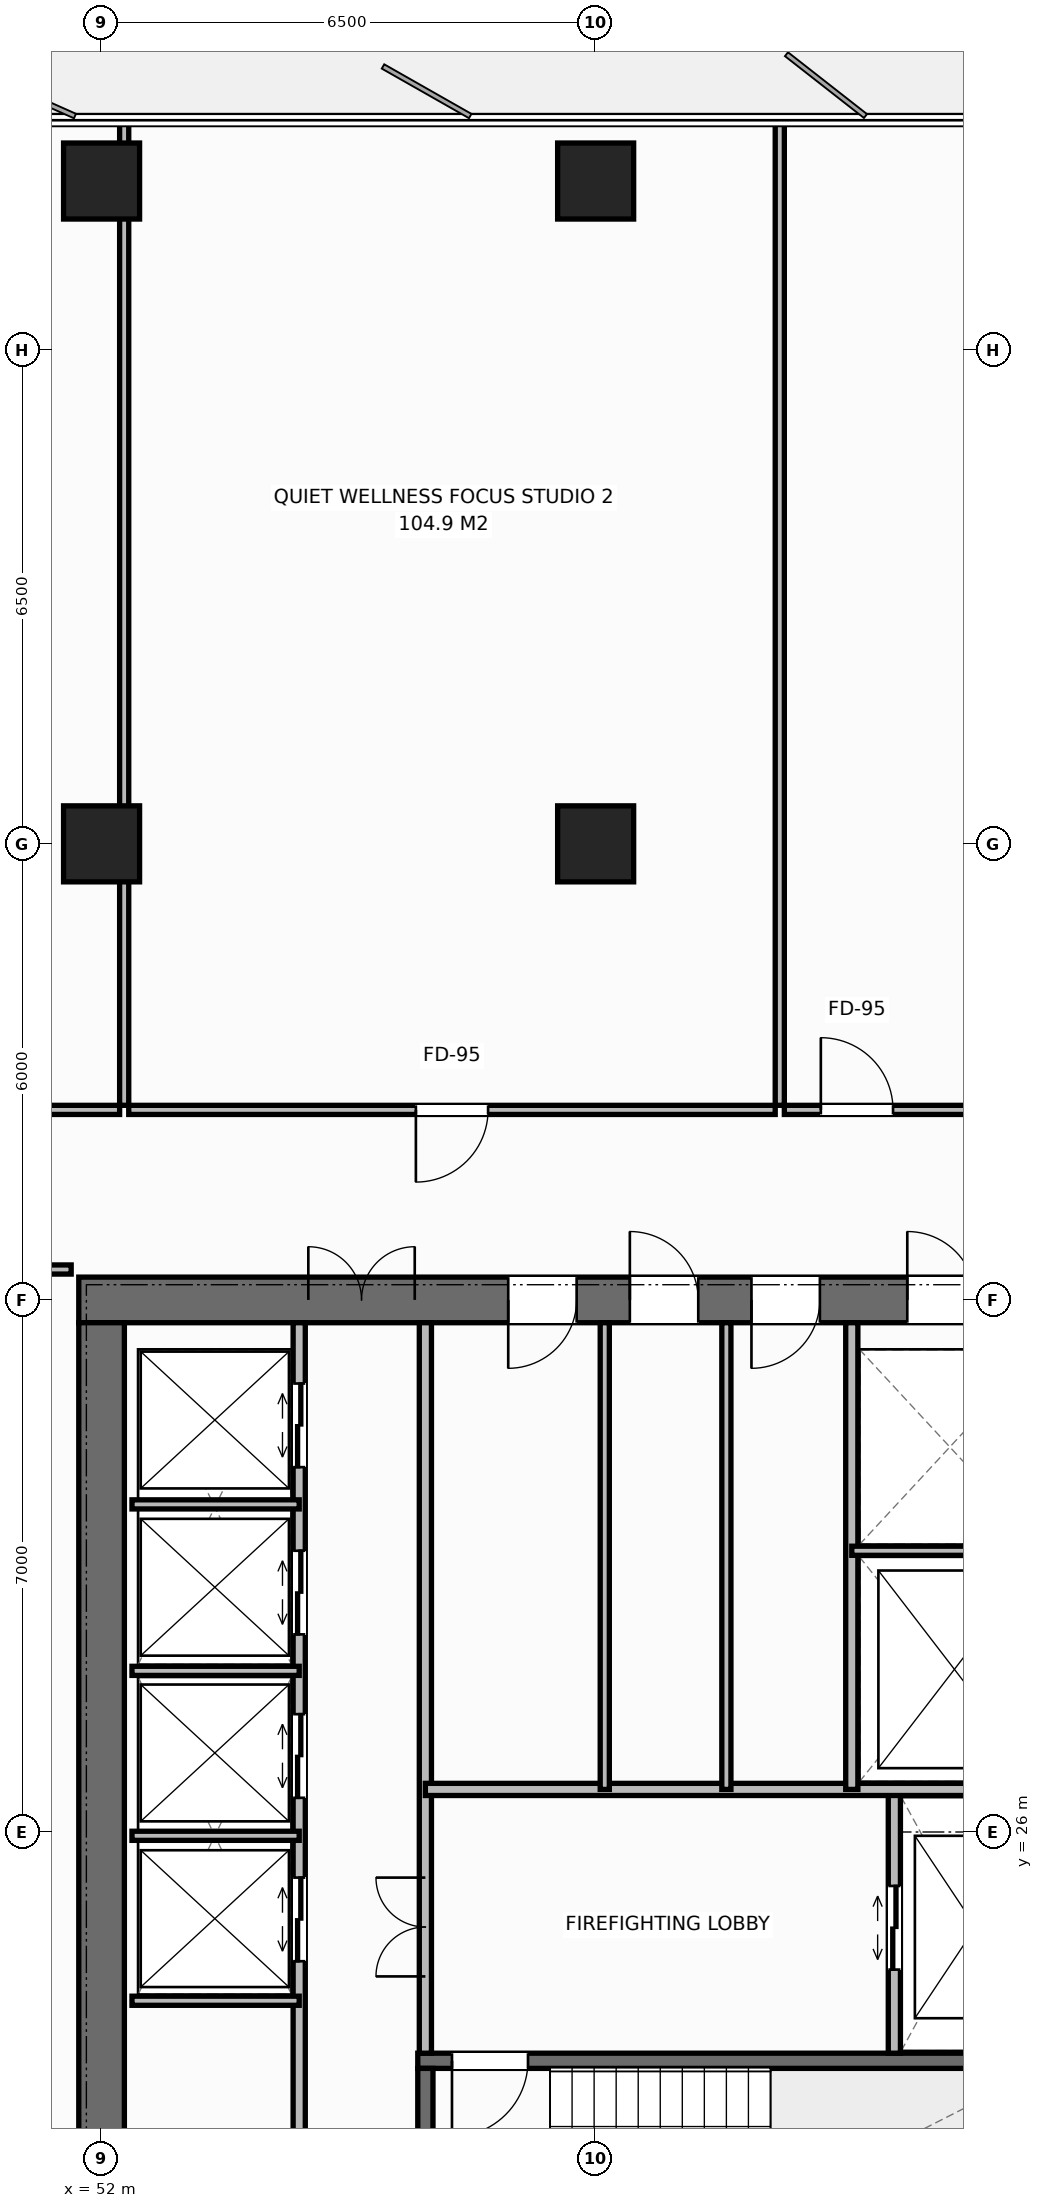
"""IFC4 building model, lengths in metres.
Left out: names, types, materials, properties, quantities, classifications, styles, units other than length and angle.
Written with IfcOpenShell. Run it as: python <this file> out.ifc"""

import sys

from ifc_helpers import new_model, si_unit, direction, frame, frame_2d, origin, origin_2d, place, context, subcontext, project, spatial, rectangle, extrude, element, fill, save


model = new_model("IFC4")
c1 = context("Model", 3, precision=1e-05, world=origin(), true_north=direction((0.0, 1.0)))
c2 = subcontext(c1, "Body", "Model", "MODEL_VIEW")
j1 = project(units=[si_unit("LENGTHUNIT", "METRE"), si_unit("PLANEANGLEUNIT", "RADIAN")], contexts=[c1])
p1 = place(None, origin())
s1 = spatial("IfcSite", under=j1, at=p1, CompositionType="ELEMENT")
p2 = place(p1, origin())
s2 = spatial("IfcBuilding", under=s1, at=p2, CompositionType="ELEMENT")
p3 = place(p2, frame((0.0, 0.0, 144.2)))
s3 = spatial("IfcBuildingStorey", under=s2, at=p3, CompositionType="ELEMENT", Elevation=144.2)
p4 = place(p3, frame((51.7, 33.0, 0.0), z_axis=(0.0, 0.0, 1.0), x_axis=(1.0, 0.0, 0.0)))
e1 = element("IfcWall", 1, at=p4, inside=s3, PredefinedType="SHEAR", context=c2, shape_type="SweptSolid", body=[
    extrude(rectangle(XDim=13.6, YDim=0.6, at=frame_2d((6.8, 0.0))), origin(), (0.0, 0.0, 1.0), 3.8),
])
p5 = place(p4, frame((3.02, 0.0, 0.0)))
e2 = element("IfcOpeningElement", 2, at=p5, cuts=e1, PredefinedType="OPENING", context=c2, shape_type="SweptSolid", body=[
    extrude(rectangle(XDim=1.4, YDim=2.2, at=frame_2d((0.7, 1.1))), frame((0.0, 0.31, 0.0), z_axis=(0.0, -1.0, 0.0), x_axis=(1.0, 0.0, 0.0)), (0.0, 0.0, 1.0), 0.62),
])
p6 = place(p4, frame((10.9, 0.0, 0.0)))
e3 = element("IfcOpeningElement", 3, at=p6, cuts=e1, PredefinedType="OPENING", context=c2, shape_type="SweptSolid", body=[
    extrude(rectangle(XDim=0.9, YDim=2.15, at=frame_2d((0.45, 1.075))), frame((0.0, 0.31, 0.0), z_axis=(0.0, -1.0, 0.0), x_axis=(1.0, 0.0, 0.0)), (0.0, 0.0, 1.0), 0.62),
])
p7 = place(p4, frame((5.65, 0.0, 0.0)))
e4 = element("IfcOpeningElement", 4, at=p7, cuts=e1, PredefinedType="OPENING", context=c2, shape_type="SweptSolid", body=[
    extrude(rectangle(XDim=0.9, YDim=2.15, at=frame_2d((0.45, 1.075))), frame((0.0, 0.31, 0.0), z_axis=(0.0, -1.0, 0.0), x_axis=(1.0, 0.0, 0.0)), (0.0, 0.0, 1.0), 0.62),
])
p8 = place(p4, frame((7.25, 0.0, 0.0)))
e5 = element("IfcOpeningElement", 5, at=p8, cuts=e1, PredefinedType="OPENING", context=c2, shape_type="SweptSolid", body=[
    extrude(rectangle(XDim=0.9, YDim=2.15, at=frame_2d((0.45, 1.075))), frame((0.0, 0.31, 0.0), z_axis=(0.0, -1.0, 0.0), x_axis=(1.0, 0.0, 0.0)), (0.0, 0.0, 1.0), 0.62),
])
p9 = place(p4, frame((8.85, 0.0, 0.0)))
e6 = element("IfcOpeningElement", 6, at=p9, cuts=e1, PredefinedType="OPENING", context=c2, shape_type="SweptSolid", body=[
    extrude(rectangle(XDim=0.9, YDim=2.15, at=frame_2d((0.45, 1.075))), frame((0.0, 0.31, 0.0), z_axis=(0.0, -1.0, 0.0), x_axis=(1.0, 0.0, 0.0)), (0.0, 0.0, 1.0), 0.62),
])
p10 = place(p3, frame((52.0, 19.3, 0.0), z_axis=(0.0, 0.0, 1.0), x_axis=(0.0, 1.0, 0.0)))
e7 = element("IfcWall", 7, at=p10, inside=s3, PredefinedType="SHEAR", context=c2, shape_type="SweptSolid", body=[
    extrude(rectangle(XDim=13.4, YDim=0.6, at=frame_2d((6.7, 0.0))), origin(), (0.0, 0.0, 1.0), 3.8),
])
p11 = place(p3, frame((56.16, 22.99, 0.0), z_axis=(0.0, 0.0, 1.0), x_axis=(1.0, 0.0, 0.0)))
e8 = element("IfcWall", 8, at=p11, inside=s3, PredefinedType="SHEAR", context=c2, shape_type="SweptSolid", body=[
    extrude(rectangle(XDim=8.43, YDim=0.2, at=frame_2d((4.215, 0.0))), origin(), (0.0, 0.0, 1.0), 3.8),
])
p12 = place(p11, frame((0.45, 0.0, 0.0)))
e9 = element("IfcOpeningElement", 9, at=p12, cuts=e8, PredefinedType="OPENING", context=c2, shape_type="SweptSolid", body=[
    extrude(rectangle(XDim=1.0, YDim=2.15, at=frame_2d((0.5, 1.075))), frame((0.0, 0.11, 0.0), z_axis=(0.0, -1.0, 0.0), x_axis=(1.0, 0.0, 0.0)), (0.0, 0.0, 1.0), 0.22),
])
p13 = place(p3, frame((56.26, 19.61, 0.0), z_axis=(0.0, 0.0, 1.0), x_axis=(0.0, 1.0, 0.0)))
e10 = element("IfcWall", 10, at=p13, inside=s3, PredefinedType="SHEAR", context=c2, shape_type="SweptSolid", body=[
    extrude(rectangle(XDim=3.28, YDim=0.2, at=frame_2d((1.64, 0.0))), origin(), (0.0, 0.0, 1.0), 3.8),
])
for number, where, z_axis, x_axis in (
    (11, (58.5, 39.0, 0.0), (0.0, 0.0, 1.0), (1.0, 0.0, 0.0)),
    (12, (52.0, 39.0, 0.0), (0.0, 0.0, 1.0), (1.0, 0.0, 0.0)),
    (13, (52.0, 47.72, 0.0), (0.0, 0.0, 1.0), (1.0, 0.0, 0.0)),
    (14, (58.5, 47.72, 0.0), (0.0, 0.0, 1.0), (1.0, 0.0, 0.0)),
):
    element("IfcColumn", number, at=place(p3, frame(where, z_axis=z_axis, x_axis=x_axis)), inside=s3, PredefinedType="COLUMN", context=c2, shape_type="SweptSolid", body=[
        extrude(rectangle(XDim=1.0, YDim=1.0, at=origin_2d()), origin(), (0.0, 0.0, 1.0), 3.8),
    ])
p14 = place(p3, frame((54.6, 19.3, 0.0), z_axis=(0.0, 0.0, 1.0), x_axis=(0.0, 1.0, 0.0)))
e15 = element("IfcWall", 15, at=p14, inside=s3, PredefinedType="STANDARD", context=c2, shape_type="SweptSolid", body=[
    extrude(rectangle(XDim=13.4, YDim=0.16, at=frame_2d((6.7, 0.0))), origin(), (0.0, 0.0, 1.0), 3.572),
])
p15 = place(p14, frame((1.7, 0.0, 0.0)))
e16 = element("IfcOpeningElement", 16, at=p15, cuts=e15, PredefinedType="OPENING", context=c2, shape_type="SweptSolid", body=[
    extrude(rectangle(XDim=0.95, YDim=2.15, at=frame_2d((0.475, 1.075))), frame((0.0, 0.09, 0.0), z_axis=(0.0, -1.0, 0.0), x_axis=(1.0, 0.0, 0.0)), (0.0, 0.0, 1.0), 0.18),
])
p16 = place(p14, frame((5.0, 0.0, 0.0)))
e17 = element("IfcOpeningElement", 17, at=p16, cuts=e15, PredefinedType="OPENING", context=c2, shape_type="SweptSolid", body=[
    extrude(rectangle(XDim=1.1, YDim=2.2, at=frame_2d((0.55, 1.1))), frame((0.0, 0.09, 0.0), z_axis=(0.0, -1.0, 0.0), x_axis=(1.0, 0.0, 0.0)), (0.0, 0.0, 1.0), 0.18),
])
p17 = place(p14, frame((7.15, 0.0, 0.0)))
e18 = element("IfcOpeningElement", 18, at=p17, cuts=e15, PredefinedType="OPENING", context=c2, shape_type="SweptSolid", body=[
    extrude(rectangle(XDim=1.1, YDim=2.2, at=frame_2d((0.55, 1.1))), frame((0.0, 0.09, 0.0), z_axis=(0.0, -1.0, 0.0), x_axis=(1.0, 0.0, 0.0)), (0.0, 0.0, 1.0), 0.18),
])
p18 = place(p14, frame((9.3, 0.0, 0.0)))
e19 = element("IfcOpeningElement", 19, at=p18, cuts=e15, PredefinedType="OPENING", context=c2, shape_type="SweptSolid", body=[
    extrude(rectangle(XDim=1.1, YDim=2.2, at=frame_2d((0.55, 1.1))), frame((0.0, 0.09, 0.0), z_axis=(0.0, -1.0, 0.0), x_axis=(1.0, 0.0, 0.0)), (0.0, 0.0, 1.0), 0.18),
])
p19 = place(p14, frame((11.5, 0.0, 0.0)))
e20 = element("IfcOpeningElement", 20, at=p19, cuts=e15, PredefinedType="OPENING", context=c2, shape_type="SweptSolid", body=[
    extrude(rectangle(XDim=1.1, YDim=2.2, at=frame_2d((0.55, 1.1))), frame((0.0, 0.09, 0.0), z_axis=(0.0, -1.0, 0.0), x_axis=(1.0, 0.0, 0.0)), (0.0, 0.0, 1.0), 0.18),
])
p20 = place(p3, frame((56.26, 23.09, 0.0), z_axis=(0.0, 0.0, 1.0), x_axis=(0.0, 1.0, 0.0)))
e21 = element("IfcWall", 21, at=p20, inside=s3, PredefinedType="STANDARD", context=c2, shape_type="SweptSolid", body=[
    extrude(rectangle(XDim=9.61, YDim=0.16, at=frame_2d((4.805, 0.0))), origin(), (0.0, 0.0, 1.0), 3.572),
])
p21 = place(p20, frame((1.01, 0.0, 0.0)))
e22 = element("IfcOpeningElement", 22, at=p21, cuts=e21, PredefinedType="OPENING", context=c2, shape_type="SweptSolid", body=[
    extrude(rectangle(XDim=1.3, YDim=2.2, at=frame_2d((0.65, 1.1))), frame((0.0, 0.09, 0.0), z_axis=(0.0, -1.0, 0.0), x_axis=(1.0, 0.0, 0.0)), (0.0, 0.0, 1.0), 0.18),
])
for number, where, z_axis, x_axis in (
    (23, (52.4, 23.78, 0.0), (0.0, 0.0, 1.0), (1.0, 0.0, 0.0)),
    (24, (52.4, 25.95, 0.0), (0.0, 0.0, 1.0), (1.0, 0.0, 0.0)),
    (25, (52.4, 28.12, 0.0), (0.0, 0.0, 1.0), (1.0, 0.0, 0.0)),
    (26, (52.4, 30.31, 0.0), (0.0, 0.0, 1.0), (1.0, 0.0, 0.0)),
):
    element("IfcWall", number, at=place(p3, frame(where, z_axis=z_axis, x_axis=x_axis)), inside=s3, PredefinedType="PARTITIONING", context=c2, shape_type="SweptSolid", body=[
        extrude(rectangle(XDim=2.2, YDim=0.12, at=frame_2d((1.1, 0.0))), origin(), (0.0, 0.0, 1.0), 3.572),
    ])
p22 = place(p3, frame((62.43, 23.09, 0.0), z_axis=(0.0, 0.0, 1.0), x_axis=(0.0, 1.0, 0.0)))
e27 = element("IfcWall", 27, at=p22, inside=s3, PredefinedType="STANDARD", context=c2, shape_type="SweptSolid", body=[
    extrude(rectangle(XDim=3.47, YDim=0.16, at=frame_2d((1.735, 0.0))), origin(), (0.0, 0.0, 1.0), 3.572),
])
p23 = place(p22, frame((1.1, 0.0, 0.0)))
e28 = element("IfcOpeningElement", 28, at=p23, cuts=e27, PredefinedType="OPENING", context=c2, shape_type="SweptSolid", body=[
    extrude(rectangle(XDim=1.1, YDim=2.2, at=frame_2d((0.55, 1.1))), frame((0.0, 0.09, 0.0), z_axis=(0.0, -1.0, 0.0), x_axis=(1.0, 0.0, 0.0)), (0.0, 0.0, 1.0), 0.18),
])
p24 = place(p3, frame((56.26, 26.56, 0.0), z_axis=(0.0, 0.0, 1.0), x_axis=(1.0, 0.0, 0.0)))
e29 = element("IfcWall", 29, at=p24, inside=s3, PredefinedType="STANDARD", context=c2, shape_type="SweptSolid", body=[
    extrude(rectangle(XDim=8.34, YDim=0.16, at=frame_2d((4.17, 0.0))), origin(), (0.0, 0.0, 1.0), 3.572),
])
p25 = place(p3, frame((61.87, 26.56, 0.0), z_axis=(0.0, 0.0, 1.0), x_axis=(0.0, 1.0, 0.0)))
e30 = element("IfcWall", 30, at=p25, inside=s3, PredefinedType="STANDARD", context=c2, shape_type="SweptSolid", body=[
    extrude(rectangle(XDim=6.14, YDim=0.16, at=frame_2d((3.07, 0.0))), origin(), (0.0, 0.0, 1.0), 3.572),
])
p26 = place(p3, frame((61.87, 29.7, 0.0), z_axis=(0.0, 0.0, 1.0), x_axis=(1.0, 0.0, 0.0)))
e31 = element("IfcWall", 31, at=p26, inside=s3, PredefinedType="PARTITIONING", context=c2, shape_type="SweptSolid", body=[
    extrude(rectangle(XDim=2.73, YDim=0.12, at=frame_2d((1.365, 0.0))), origin(), (0.0, 0.0, 1.0), 3.572),
])
for number, where, z_axis, x_axis in (
    (32, (58.62, 26.56, 0.0), (0.0, 0.0, 1.0), (0.0, 1.0, 0.0)),
    (33, (60.22, 26.56, 0.0), (0.0, 0.0, 1.0), (0.0, 1.0, 0.0)),
):
    element("IfcWall", number, at=place(p3, frame(where, z_axis=z_axis, x_axis=x_axis)), inside=s3, PredefinedType="PARTITIONING", context=c2, shape_type="SweptSolid", body=[
        extrude(rectangle(XDim=6.14, YDim=0.12, at=frame_2d((3.07, 0.0))), origin(), (0.0, 0.0, 1.0), 3.572),
    ])
p27 = place(p3, frame((48.0, 33.4, 0.0), z_axis=(0.0, 0.0, 1.0), x_axis=(1.0, 0.0, 0.0)))
e34 = element("IfcWall", 34, at=p27, inside=s3, PredefinedType="PARTITIONING", context=c2, shape_type="SweptSolid", body=[
    extrude(rectangle(XDim=3.6, YDim=0.12, at=frame_2d((1.8, 0.0))), origin(), (0.0, 0.0, 1.0), 3.572),
])
p28 = place(p27, frame((1.1, 0.0, 0.0)))
e35 = element("IfcOpeningElement", 35, at=p28, cuts=e34, PredefinedType="OPENING", context=c2, shape_type="SweptSolid", body=[
    extrude(rectangle(XDim=0.95, YDim=2.15, at=frame_2d((0.475, 1.075))), frame((0.0, 0.07, 0.0), z_axis=(0.0, -1.0, 0.0), x_axis=(1.0, 0.0, 0.0)), (0.0, 0.0, 1.0), 0.14),
])
p29 = place(p3, frame((52.297, 35.56, 0.0), z_axis=(0.0, 0.0, 1.0), x_axis=(0.0, 1.0, 0.0)))
e36 = element("IfcWall", 36, at=p29, inside=s3, PredefinedType="PARTITIONING", context=c2, shape_type="SweptSolid", body=[
    extrude(rectangle(XDim=13.02, YDim=0.12, at=frame_2d((6.51, 0.0))), origin(), (0.0, 0.0, 1.0), 3.572),
])
p30 = place(p3, frame((39.26, 35.5, 0.0), z_axis=(0.0, 0.0, 1.0), x_axis=(1.0, 0.0, 0.0)))
e37 = element("IfcWall", 37, at=p30, inside=s3, PredefinedType="PARTITIONING", context=c2, shape_type="SweptSolid", body=[
    extrude(rectangle(XDim=12.977, YDim=0.12, at=frame_2d((6.489, 0.0))), origin(), (0.0, 0.0, 1.0), 3.572),
])
p31 = place(p30, frame((3.893, 0.0, 0.0)))
e38 = element("IfcOpeningElement", 38, at=p31, cuts=e37, PredefinedType="OPENING", context=c2, shape_type="SweptSolid", body=[
    extrude(rectangle(XDim=0.95, YDim=2.15, at=frame_2d((0.475, 1.075))), frame((0.0, 0.07, 0.0), z_axis=(0.0, -1.0, 0.0), x_axis=(1.0, 0.0, 0.0)), (0.0, 0.0, 1.0), 0.14),
])
p32 = place(p3, frame((60.923, 35.56, 0.0), z_axis=(0.0, 0.0, 1.0), x_axis=(0.0, 1.0, 0.0)))
e39 = element("IfcWall", 39, at=p32, inside=s3, PredefinedType="PARTITIONING", context=c2, shape_type="SweptSolid", body=[
    extrude(rectangle(XDim=13.02, YDim=0.12, at=frame_2d((6.51, 0.0))), origin(), (0.0, 0.0, 1.0), 3.572),
])
p33 = place(p3, frame((52.357, 35.5, 0.0), z_axis=(0.0, 0.0, 1.0), x_axis=(1.0, 0.0, 0.0)))
e40 = element("IfcWall", 40, at=p33, inside=s3, PredefinedType="PARTITIONING", context=c2, shape_type="SweptSolid", body=[
    extrude(rectangle(XDim=8.505, YDim=0.12, at=frame_2d((4.252, 0.0))), origin(), (0.0, 0.0, 1.0), 3.572),
])
p34 = place(p33, frame((3.778, 0.0, 0.0)))
e41 = element("IfcOpeningElement", 41, at=p34, cuts=e40, PredefinedType="OPENING", context=c2, shape_type="SweptSolid", body=[
    extrude(rectangle(XDim=0.95, YDim=2.15, at=frame_2d((0.475, 1.075))), frame((0.0, 0.07, 0.0), z_axis=(0.0, -1.0, 0.0), x_axis=(1.0, 0.0, 0.0)), (0.0, 0.0, 1.0), 0.14),
])
p35 = place(p3, frame((60.983, 35.5, 0.0), z_axis=(0.0, 0.0, 1.0), x_axis=(1.0, 0.0, 0.0)))
e42 = element("IfcWall", 42, at=p35, inside=s3, PredefinedType="PARTITIONING", context=c2, shape_type="SweptSolid", body=[
    extrude(rectangle(XDim=13.037, YDim=0.12, at=frame_2d((6.519, 0.0))), origin(), (0.0, 0.0, 1.0), 3.572),
])
p36 = place(p35, frame((0.48, 0.0, 0.0)))
e43 = element("IfcOpeningElement", 43, at=p36, cuts=e42, PredefinedType="OPENING", context=c2, shape_type="SweptSolid", body=[
    extrude(rectangle(XDim=0.95, YDim=2.15, at=frame_2d((0.475, 1.075))), frame((0.0, 0.07, 0.0), z_axis=(0.0, -1.0, 0.0), x_axis=(1.0, 0.0, 0.0)), (0.0, 0.0, 1.0), 0.14),
])
p37 = place(p5, origin())
e44 = element("IfcDoor", 44, at=p37, inside=s3, OperationType="DOUBLE_DOOR_SINGLE_SWING", PredefinedType="DOOR", context=c2, shape_type="SweptSolid", body=[
    extrude(rectangle(XDim=1.4, YDim=2.2, at=frame_2d((0.7, 1.1))), frame((0.0, -0.025, 0.0), z_axis=(0.0, -1.0, 0.0), x_axis=(1.0, 0.0, 0.0)), (0.0, 0.0, 1.0), 0.05),
])
fill(e2, e44)
p38 = place(p16, origin())
e45 = element("IfcDoor", 45, at=p38, inside=s3, OperationType="DOUBLE_DOOR_SLIDING", PredefinedType="DOOR", context=c2, shape_type="SweptSolid", body=[
    extrude(rectangle(XDim=1.1, YDim=2.2, at=frame_2d((0.55, 1.1))), frame((0.0, 0.025, 0.0), z_axis=(0.0, -1.0, 0.0), x_axis=(1.0, 0.0, 0.0)), (0.0, 0.0, 1.0), 0.05),
])
fill(e17, e45)
p39 = place(p17, origin())
e46 = element("IfcDoor", 46, at=p39, inside=s3, OperationType="DOUBLE_DOOR_SLIDING", PredefinedType="DOOR", context=c2, shape_type="SweptSolid", body=[
    extrude(rectangle(XDim=1.1, YDim=2.2, at=frame_2d((0.55, 1.1))), frame((0.0, 0.025, 0.0), z_axis=(0.0, -1.0, 0.0), x_axis=(1.0, 0.0, 0.0)), (0.0, 0.0, 1.0), 0.05),
])
fill(e18, e46)
p40 = place(p18, origin())
e47 = element("IfcDoor", 47, at=p40, inside=s3, OperationType="DOUBLE_DOOR_SLIDING", PredefinedType="DOOR", context=c2, shape_type="SweptSolid", body=[
    extrude(rectangle(XDim=1.1, YDim=2.2, at=frame_2d((0.55, 1.1))), frame((0.0, 0.025, 0.0), z_axis=(0.0, -1.0, 0.0), x_axis=(1.0, 0.0, 0.0)), (0.0, 0.0, 1.0), 0.05),
])
fill(e19, e47)
p41 = place(p19, origin())
e48 = element("IfcDoor", 48, at=p41, inside=s3, OperationType="DOUBLE_DOOR_SLIDING", PredefinedType="DOOR", context=c2, shape_type="SweptSolid", body=[
    extrude(rectangle(XDim=1.1, YDim=2.2, at=frame_2d((0.55, 1.1))), frame((0.0, 0.025, 0.0), z_axis=(0.0, -1.0, 0.0), x_axis=(1.0, 0.0, 0.0)), (0.0, 0.0, 1.0), 0.05),
])
fill(e20, e48)
p42 = place(p12, origin())
e49 = element("IfcDoor", 49, at=p42, inside=s3, OperationType="SINGLE_SWING_RIGHT", PredefinedType="DOOR", context=c2, shape_type="SweptSolid", body=[
    extrude(rectangle(XDim=1.0, YDim=2.15, at=frame_2d((0.5, 1.075))), frame((0.0, 0.025, 0.0), z_axis=(0.0, -1.0, 0.0), x_axis=(1.0, 0.0, 0.0)), (0.0, 0.0, 1.0), 0.05),
])
fill(e9, e49)
p43 = place(p23, origin())
e50 = element("IfcDoor", 50, at=p43, inside=s3, OperationType="DOUBLE_DOOR_SLIDING", PredefinedType="DOOR", context=c2, shape_type="SweptSolid", body=[
    extrude(rectangle(XDim=1.1, YDim=2.2, at=frame_2d((0.55, 1.1))), frame((0.0, 0.025, 0.0), z_axis=(0.0, -1.0, 0.0), x_axis=(1.0, 0.0, 0.0)), (0.0, 0.0, 1.0), 0.05),
])
fill(e28, e50)
p44 = place(p21, origin())
e51 = element("IfcDoor", 51, at=p44, inside=s3, OperationType="DOUBLE_DOOR_SINGLE_SWING", PredefinedType="DOOR", context=c2, shape_type="SweptSolid", body=[
    extrude(rectangle(XDim=1.3, YDim=2.2, at=frame_2d((0.65, 1.1))), frame((0.0, 0.025, 0.0), z_axis=(0.0, -1.0, 0.0), x_axis=(1.0, 0.0, 0.0)), (0.0, 0.0, 1.0), 0.05),
])
fill(e22, e51)
p45 = place(p6, origin())
e52 = element("IfcDoor", 52, at=p45, inside=s3, OperationType="SINGLE_SWING_LEFT", PredefinedType="DOOR", context=c2, shape_type="SweptSolid", body=[
    extrude(rectangle(XDim=0.9, YDim=2.15, at=frame_2d((0.45, 1.075))), frame((0.0, -0.025, 0.0), z_axis=(0.0, -1.0, 0.0), x_axis=(1.0, 0.0, 0.0)), (0.0, 0.0, 1.0), 0.05),
])
fill(e3, e52)
p46 = place(p7, origin())
e53 = element("IfcDoor", 53, at=p46, inside=s3, OperationType="SINGLE_SWING_RIGHT", PredefinedType="DOOR", context=c2, shape_type="SweptSolid", body=[
    extrude(rectangle(XDim=0.9, YDim=2.15, at=frame_2d((0.45, 1.075))), frame((0.0, -0.025, 0.0), z_axis=(0.0, -1.0, 0.0), x_axis=(1.0, 0.0, 0.0)), (0.0, 0.0, 1.0), 0.05),
])
fill(e4, e53)
p47 = place(p8, origin())
e54 = element("IfcDoor", 54, at=p47, inside=s3, OperationType="SINGLE_SWING_LEFT", PredefinedType="DOOR", context=c2, shape_type="SweptSolid", body=[
    extrude(rectangle(XDim=0.9, YDim=2.15, at=frame_2d((0.45, 1.075))), frame((0.0, -0.025, 0.0), z_axis=(0.0, -1.0, 0.0), x_axis=(1.0, 0.0, 0.0)), (0.0, 0.0, 1.0), 0.05),
])
fill(e5, e54)
p48 = place(p9, origin())
e55 = element("IfcDoor", 55, at=p48, inside=s3, OperationType="SINGLE_SWING_RIGHT", PredefinedType="DOOR", context=c2, shape_type="SweptSolid", body=[
    extrude(rectangle(XDim=0.9, YDim=2.15, at=frame_2d((0.45, 1.075))), frame((0.0, -0.025, 0.0), z_axis=(0.0, -1.0, 0.0), x_axis=(1.0, 0.0, 0.0)), (0.0, 0.0, 1.0), 0.05),
])
fill(e6, e55)
p49 = place(p34, origin())
e56 = element("IfcDoor", 56, at=p49, inside=s3, OperationType="SINGLE_SWING_RIGHT", PredefinedType="DOOR", context=c2, shape_type="SweptSolid", body=[
    extrude(rectangle(XDim=0.95, YDim=2.15, at=frame_2d((0.475, 1.075))), frame((0.0, 0.025, 0.0), z_axis=(0.0, -1.0, 0.0), x_axis=(1.0, 0.0, 0.0)), (0.0, 0.0, 1.0), 0.05),
])
fill(e41, e56)
p50 = place(p36, origin())
e57 = element("IfcDoor", 57, at=p50, inside=s3, OperationType="SINGLE_SWING_LEFT", PredefinedType="DOOR", context=c2, shape_type="SweptSolid", body=[
    extrude(rectangle(XDim=0.95, YDim=2.15, at=frame_2d((0.475, 1.075))), frame((0.0, 0.025, 0.0), z_axis=(0.0, -1.0, 0.0), x_axis=(1.0, 0.0, 0.0)), (0.0, 0.0, 1.0), 0.05),
])
fill(e43, e57)
save(model, sys.argv[1])
